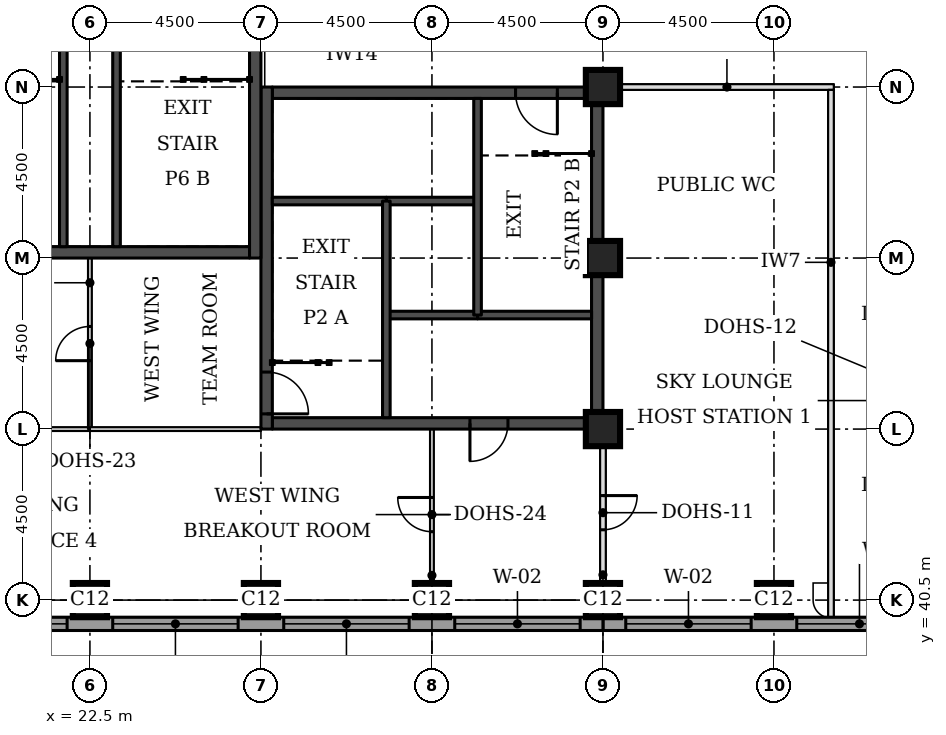
"""IFC4 building model, lengths in metres.
Left out: names, types, materials, properties, quantities, classifications, styles, units other than length and angle.
Written with IfcOpenShell. Run it as: python <this file> out.ifc"""

import sys

from ifc_helpers import new_model, si_unit, direction, frame, frame_2d, origin, origin_2d, place, context, subcontext, project, spatial, rectangle, extrude, element, fill, save


model = new_model("IFC4")
c1 = context("Model", 3, precision=1e-05, world=origin(), true_north=direction((0.0, 1.0)))
c2 = subcontext(c1, "Body", "Model", "MODEL_VIEW")
j1 = project(units=[si_unit("LENGTHUNIT", "METRE"), si_unit("PLANEANGLEUNIT", "RADIAN")], contexts=[c1])
p1 = place(None, origin())
s1 = spatial("IfcSite", under=j1, at=p1, CompositionType="ELEMENT")
p2 = place(p1, origin())
s2 = spatial("IfcBuilding", under=s1, at=p2, CompositionType="ELEMENT")
p3 = place(p2, frame((0.0, 0.0, 260.0)))
s3 = spatial("IfcBuildingStorey", under=s2, at=p3, CompositionType="ELEMENT", Elevation=260.0)
for number, where, z_axis, x_axis in (
    (1, (22.5, 40.5, 0.0), (0.0, 0.0, 1.0), (1.0, 0.0, 0.0)),
    (2, (27.0, 40.5, 0.0), (0.0, 0.0, 1.0), (1.0, 0.0, 0.0)),
    (3, (31.5, 40.5, 0.0), (0.0, 0.0, 1.0), (1.0, 0.0, 0.0)),
    (4, (36.0, 40.5, 0.0), (0.0, 0.0, 1.0), (1.0, 0.0, 0.0)),
    (5, (40.5, 40.5, 0.0), (0.0, 0.0, 1.0), (1.0, 0.0, 0.0)),
    (6, (36.0, 45.0, 0.0), (0.0, 0.0, 1.0), (1.0, 0.0, 0.0)),
    (7, (36.0, 49.5, 0.0), (0.0, 0.0, 1.0), (1.0, 0.0, 0.0)),
    (8, (36.0, 54.0, 0.0), (0.0, 0.0, 1.0), (1.0, 0.0, 0.0)),
):
    element("IfcColumn", number, at=place(p3, frame(where, z_axis=z_axis, x_axis=x_axis)), inside=s3, PredefinedType="COLUMN", context=c2, shape_type="SweptSolid", body=[
        extrude(rectangle(XDim=0.9, YDim=0.9, at=origin_2d()), origin(), (0.0, 0.0, 1.0), 3.7),
    ])
p4 = place(p3, frame((27.3, 45.15, 0.0), z_axis=(0.0, 0.0, 1.0), x_axis=(1.0, 0.0, 0.0)))
e9 = element("IfcWall", 9, at=p4, inside=s3, PredefinedType="SHEAR", context=c2, shape_type="SweptSolid", body=[
    extrude(rectangle(XDim=8.4, YDim=0.3, at=frame_2d((4.2, 0.0))), origin(), (0.0, 0.0, 1.0), 3.7),
])
p5 = place(p4, frame((5.2, 0.0, 0.0)))
e10 = element("IfcOpeningElement", 10, at=p5, cuts=e9, PredefinedType="OPENING", context=c2, shape_type="SweptSolid", body=[
    extrude(rectangle(XDim=1.0, YDim=2.1, at=frame_2d((0.5, 1.05))), frame((0.0, 0.16, 0.0), z_axis=(0.0, -1.0, 0.0), x_axis=(1.0, 0.0, 0.0)), (0.0, 0.0, 1.0), 0.32),
])
p6 = place(p3, frame((27.3, 53.85, 0.0), z_axis=(0.0, 0.0, 1.0), x_axis=(1.0, 0.0, 0.0)))
e11 = element("IfcWall", 11, at=p6, inside=s3, PredefinedType="SHEAR", context=c2, shape_type="SweptSolid", body=[
    extrude(rectangle(XDim=8.4, YDim=0.3, at=frame_2d((4.2, 0.0))), origin(), (0.0, 0.0, 1.0), 3.7),
])
p7 = place(p6, frame((6.4, 0.0, 0.0)))
e12 = element("IfcOpeningElement", 12, at=p7, cuts=e11, PredefinedType="OPENING", context=c2, shape_type="SweptSolid", body=[
    extrude(rectangle(XDim=1.1, YDim=2.1, at=frame_2d((0.55, 1.05))), frame((0.0, 0.16, 0.0), z_axis=(0.0, -1.0, 0.0), x_axis=(1.0, 0.0, 0.0)), (0.0, 0.0, 1.0), 0.32),
])
p8 = place(p3, frame((27.15, 45.0, 0.0), z_axis=(0.0, 0.0, 1.0), x_axis=(0.0, 1.0, 0.0)))
e13 = element("IfcWall", 13, at=p8, inside=s3, PredefinedType="SHEAR", context=c2, shape_type="SweptSolid", body=[
    extrude(rectangle(XDim=9.0, YDim=0.3, at=frame_2d((4.5, 0.0))), origin(), (0.0, 0.0, 1.0), 3.7),
])
p9 = place(p8, frame((0.4, 0.0, 0.0)))
e14 = element("IfcOpeningElement", 14, at=p9, cuts=e13, PredefinedType="OPENING", context=c2, shape_type="SweptSolid", body=[
    extrude(rectangle(XDim=1.1, YDim=2.1, at=frame_2d((0.55, 1.05))), frame((0.0, 0.16, 0.0), z_axis=(0.0, -1.0, 0.0), x_axis=(1.0, 0.0, 0.0)), (0.0, 0.0, 1.0), 0.32),
])
p10 = place(p3, frame((35.85, 45.0, 0.0), z_axis=(0.0, 0.0, 1.0), x_axis=(0.0, 1.0, 0.0)))
e15 = element("IfcWall", 15, at=p10, inside=s3, PredefinedType="SHEAR", context=c2, shape_type="SweptSolid", body=[
    extrude(rectangle(XDim=9.0, YDim=0.3, at=frame_2d((4.5, 0.0))), origin(), (0.0, 0.0, 1.0), 3.7),
])
p11 = place(p3, frame((18.3, 49.65, 0.0), z_axis=(0.0, 0.0, 1.0), x_axis=(1.0, 0.0, 0.0)))
e16 = element("IfcWall", 16, at=p11, inside=s3, PredefinedType="SHEAR", context=c2, shape_type="SweptSolid", body=[
    extrude(rectangle(XDim=8.4, YDim=0.3, at=frame_2d((4.2, 0.0))), origin(), (0.0, 0.0, 1.0), 3.7),
])
p12 = place(p3, frame((26.85, 49.5, 0.0), z_axis=(0.0, 0.0, 1.0), x_axis=(0.0, 1.0, 0.0)))
e17 = element("IfcWall", 17, at=p12, inside=s3, PredefinedType="SHEAR", context=c2, shape_type="SweptSolid", body=[
    extrude(rectangle(XDim=9.0, YDim=0.3, at=frame_2d((4.5, 0.0))), origin(), (0.0, 0.0, 1.0), 3.7),
])
p13 = place(p12, frame((6.6, 0.0, 0.0)))
e18 = element("IfcOpeningElement", 18, at=p13, cuts=e17, PredefinedType="OPENING", context=c2, shape_type="SweptSolid", body=[
    extrude(rectangle(XDim=1.8, YDim=2.1, at=frame_2d((0.9, 1.05))), frame((0.0, 0.16, 0.0), z_axis=(0.0, -1.0, 0.0), x_axis=(1.0, 0.0, 0.0)), (0.0, 0.0, 1.0), 0.32),
])
p14 = place(p3, frame((36.0, 39.875, 0.0), z_axis=(0.0, 0.0, 1.0), x_axis=(1.0, 0.0, 0.0)))
e19 = element("IfcWall", 19, at=p14, inside=s3, PredefinedType="STANDARD", context=c2, shape_type="SweptSolid", body=[
    extrude(rectangle(XDim=36.331, YDim=0.35, at=frame_2d((18.166, 0.0))), origin(), (0.0, 0.0, 1.0), 3.425),
])
p15 = place(p14, frame((0.6, 0.0, 0.9)))
e20 = element("IfcOpeningElement", 20, at=p15, cuts=e19, PredefinedType="OPENING", context=c2, shape_type="SweptSolid", body=[
    extrude(rectangle(XDim=3.3, YDim=1.9, at=frame_2d((1.65, 0.95))), frame((0.0, 0.185, 0.0), z_axis=(0.0, -1.0, 0.0), x_axis=(1.0, 0.0, 0.0)), (0.0, 0.0, 1.0), 0.37),
])
p16 = place(p14, frame((5.1, 0.0, 0.9)))
e21 = element("IfcOpeningElement", 21, at=p16, cuts=e19, PredefinedType="OPENING", context=c2, shape_type="SweptSolid", body=[
    extrude(rectangle(XDim=3.3, YDim=1.9, at=frame_2d((1.65, 0.95))), frame((0.0, 0.185, 0.0), z_axis=(0.0, -1.0, 0.0), x_axis=(1.0, 0.0, 0.0)), (0.0, 0.0, 1.0), 0.37),
])
p17 = place(p14, frame((9.6, 0.0, 0.9)))
e22 = element("IfcOpeningElement", 22, at=p17, cuts=e19, PredefinedType="OPENING", context=c2, shape_type="SweptSolid", body=[
    extrude(rectangle(XDim=3.3, YDim=1.9, at=frame_2d((1.65, 0.95))), frame((0.0, 0.185, 0.0), z_axis=(0.0, -1.0, 0.0), x_axis=(1.0, 0.0, 0.0)), (0.0, 0.0, 1.0), 0.37),
])
p18 = place(p14, frame((14.1, 0.0, 0.9)))
e23 = element("IfcOpeningElement", 23, at=p18, cuts=e19, PredefinedType="OPENING", context=c2, shape_type="SweptSolid", body=[
    extrude(rectangle(XDim=3.3, YDim=1.9, at=frame_2d((1.65, 0.95))), frame((0.0, 0.185, 0.0), z_axis=(0.0, -1.0, 0.0), x_axis=(1.0, 0.0, 0.0)), (0.0, 0.0, 1.0), 0.37),
])
p19 = place(p14, frame((18.6, 0.0, 0.9)))
e24 = element("IfcOpeningElement", 24, at=p19, cuts=e19, PredefinedType="OPENING", context=c2, shape_type="SweptSolid", body=[
    extrude(rectangle(XDim=3.3, YDim=1.9, at=frame_2d((1.65, 0.95))), frame((0.0, 0.185, 0.0), z_axis=(0.0, -1.0, 0.0), x_axis=(1.0, 0.0, 0.0)), (0.0, 0.0, 1.0), 0.37),
])
p20 = place(p14, frame((23.1, 0.0, 0.9)))
e25 = element("IfcOpeningElement", 25, at=p20, cuts=e19, PredefinedType="OPENING", context=c2, shape_type="SweptSolid", body=[
    extrude(rectangle(XDim=3.3, YDim=1.9, at=frame_2d((1.65, 0.95))), frame((0.0, 0.185, 0.0), z_axis=(0.0, -1.0, 0.0), x_axis=(1.0, 0.0, 0.0)), (0.0, 0.0, 1.0), 0.37),
])
p21 = place(p14, frame((27.6, 0.0, 0.9)))
e26 = element("IfcOpeningElement", 26, at=p21, cuts=e19, PredefinedType="OPENING", context=c2, shape_type="SweptSolid", body=[
    extrude(rectangle(XDim=3.3, YDim=1.9, at=frame_2d((1.65, 0.95))), frame((0.0, 0.185, 0.0), z_axis=(0.0, -1.0, 0.0), x_axis=(1.0, 0.0, 0.0)), (0.0, 0.0, 1.0), 0.37),
])
p22 = place(p14, frame((32.1, 0.0, 0.9)))
e27 = element("IfcOpeningElement", 27, at=p22, cuts=e19, PredefinedType="OPENING", context=c2, shape_type="SweptSolid", body=[
    extrude(rectangle(XDim=3.3, YDim=1.9, at=frame_2d((1.65, 0.95))), frame((0.0, 0.185, 0.0), z_axis=(0.0, -1.0, 0.0), x_axis=(1.0, 0.0, 0.0)), (0.0, 0.0, 1.0), 0.37),
])
p23 = place(p3, frame((17.669, 39.875, 0.0), z_axis=(0.0, 0.0, 1.0), x_axis=(1.0, 0.0, 0.0)))
e28 = element("IfcWall", 28, at=p23, inside=s3, PredefinedType="STANDARD", context=c2, shape_type="SweptSolid", body=[
    extrude(rectangle(XDim=18.331, YDim=0.35, at=frame_2d((9.166, 0.0))), origin(), (0.0, 0.0, 1.0), 3.375),
])
p24 = place(p23, frame((0.931, 0.0, 0.9)))
e29 = element("IfcOpeningElement", 29, at=p24, cuts=e28, PredefinedType="OPENING", context=c2, shape_type="SweptSolid", body=[
    extrude(rectangle(XDim=3.3, YDim=1.9, at=frame_2d((1.65, 0.95))), frame((0.0, 0.185, 0.0), z_axis=(0.0, -1.0, 0.0), x_axis=(1.0, 0.0, 0.0)), (0.0, 0.0, 1.0), 0.37),
])
p25 = place(p23, frame((5.431, 0.0, 0.9)))
e30 = element("IfcOpeningElement", 30, at=p25, cuts=e28, PredefinedType="OPENING", context=c2, shape_type="SweptSolid", body=[
    extrude(rectangle(XDim=3.3, YDim=1.9, at=frame_2d((1.65, 0.95))), frame((0.0, 0.185, 0.0), z_axis=(0.0, -1.0, 0.0), x_axis=(1.0, 0.0, 0.0)), (0.0, 0.0, 1.0), 0.37),
])
p26 = place(p23, frame((9.931, 0.0, 0.9)))
e31 = element("IfcOpeningElement", 31, at=p26, cuts=e28, PredefinedType="OPENING", context=c2, shape_type="SweptSolid", body=[
    extrude(rectangle(XDim=3.3, YDim=1.9, at=frame_2d((1.65, 0.95))), frame((0.0, 0.185, 0.0), z_axis=(0.0, -1.0, 0.0), x_axis=(1.0, 0.0, 0.0)), (0.0, 0.0, 1.0), 0.37),
])
p27 = place(p23, frame((14.431, 0.0, 0.9)))
e32 = element("IfcOpeningElement", 32, at=p27, cuts=e28, PredefinedType="OPENING", context=c2, shape_type="SweptSolid", body=[
    extrude(rectangle(XDim=3.3, YDim=1.9, at=frame_2d((1.65, 0.95))), frame((0.0, 0.185, 0.0), z_axis=(0.0, -1.0, 0.0), x_axis=(1.0, 0.0, 0.0)), (0.0, 0.0, 1.0), 0.37),
])
p28 = place(p3, frame((36.45, 54.0, 0.0), z_axis=(0.0, 0.0, 1.0), x_axis=(1.0, 0.0, 0.0)))
e33 = element("IfcWall", 33, at=p28, inside=s3, PredefinedType="PARTITIONING", context=c2, shape_type="SweptSolid", body=[
    extrude(rectangle(XDim=5.625, YDim=0.15, at=frame_2d((2.812, 0.0))), origin(), (0.0, 0.0, 1.0), 3.45),
])
p29 = place(p3, frame((42.0, 40.05, 0.0), z_axis=(0.0, 0.0, 1.0), x_axis=(0.0, 1.0, 0.0)))
e34 = element("IfcWall", 34, at=p29, inside=s3, PredefinedType="PARTITIONING", context=c2, shape_type="SweptSolid", body=[
    extrude(rectangle(XDim=13.875, YDim=0.15, at=frame_2d((6.938, 0.0))), origin(), (0.0, 0.0, 1.0), 3.45),
])
p30 = place(p3, frame((36.0, 40.95, 0.0), z_axis=(0.0, 0.0, 1.0), x_axis=(0.0, 1.0, 0.0)))
e35 = element("IfcWall", 35, at=p30, inside=s3, PredefinedType="PARTITIONING", context=c2, shape_type="SweptSolid", body=[
    extrude(rectangle(XDim=3.63, YDim=0.15, at=frame_2d((1.815, 0.0))), origin(), (0.0, 0.0, 1.0), 3.45),
])
p31 = place(p30, frame((1.4, 0.0, 0.0)))
e36 = element("IfcOpeningElement", 36, at=p31, cuts=e35, PredefinedType="OPENING", context=c2, shape_type="SweptSolid", body=[
    extrude(rectangle(XDim=0.9, YDim=2.1, at=frame_2d((0.45, 1.05))), frame((0.0, 0.085, 0.0), z_axis=(0.0, -1.0, 0.0), x_axis=(1.0, 0.0, 0.0)), (0.0, 0.0, 1.0), 0.17),
])
p32 = place(p3, frame((22.5, 45.0, 0.0), z_axis=(0.0, 0.0, 1.0), x_axis=(-1.0, 0.0, 0.0)))
e37 = element("IfcWall", 37, at=p32, inside=s3, PredefinedType="PARTITIONING", context=c2, shape_type="SweptSolid", body=[
    extrude(rectangle(XDim=9.0, YDim=0.1, at=frame_2d((4.5, 0.0))), origin(), (0.0, 0.0, 1.0), 2.4),
])
p33 = place(p32, frame((4.05, 0.0, 0.0)))
e38 = element("IfcOpeningElement", 38, at=p33, cuts=e37, PredefinedType="OPENING", context=c2, shape_type="SweptSolid", body=[
    extrude(rectangle(XDim=0.9, YDim=2.1, at=frame_2d((0.45, 1.05))), frame((0.0, 0.06, 0.0), z_axis=(0.0, -1.0, 0.0), x_axis=(1.0, 0.0, 0.0)), (0.0, 0.0, 1.0), 0.12),
])
p34 = place(p3, frame((22.5, 49.5, 0.0), z_axis=(0.0, 0.0, 1.0), x_axis=(0.0, -1.0, 0.0)))
e39 = element("IfcWall", 39, at=p34, inside=s3, PredefinedType="PARTITIONING", context=c2, shape_type="SweptSolid", body=[
    extrude(rectangle(XDim=4.5, YDim=0.1, at=frame_2d((2.25, 0.0))), origin(), (0.0, 0.0, 1.0), 3.45),
])
p35 = place(p34, frame((1.8, 0.0, 0.0)))
e40 = element("IfcOpeningElement", 40, at=p35, cuts=e39, PredefinedType="OPENING", context=c2, shape_type="SweptSolid", body=[
    extrude(rectangle(XDim=0.9, YDim=2.1, at=frame_2d((0.45, 1.05))), frame((0.0, 0.06, 0.0), z_axis=(0.0, -1.0, 0.0), x_axis=(1.0, 0.0, 0.0)), (0.0, 0.0, 1.0), 0.12),
])
p36 = place(p3, frame((22.5, 45.0, 0.0), z_axis=(0.0, 0.0, 1.0), x_axis=(1.0, 0.0, 0.0)))
e41 = element("IfcWall", 41, at=p36, inside=s3, PredefinedType="PARTITIONING", context=c2, shape_type="SweptSolid", body=[
    extrude(rectangle(XDim=4.5, YDim=0.1, at=frame_2d((2.25, 0.0))), origin(), (0.0, 0.0, 1.0), 2.4),
])
p37 = place(p3, frame((31.5, 45.0, 0.0), z_axis=(0.0, 0.0, 1.0), x_axis=(0.0, -1.0, 0.0)))
e42 = element("IfcWall", 42, at=p37, inside=s3, PredefinedType="PARTITIONING", context=c2, shape_type="SweptSolid", body=[
    extrude(rectangle(XDim=4.5, YDim=0.1, at=frame_2d((2.25, 0.0))), origin(), (0.0, 0.0, 1.0), 3.45),
])
p38 = place(p37, frame((1.8, 0.0, 0.0)))
e43 = element("IfcOpeningElement", 43, at=p38, cuts=e42, PredefinedType="OPENING", context=c2, shape_type="SweptSolid", body=[
    extrude(rectangle(XDim=0.9, YDim=2.1, at=frame_2d((0.45, 1.05))), frame((0.0, 0.06, 0.0), z_axis=(0.0, -1.0, 0.0), x_axis=(1.0, 0.0, 0.0)), (0.0, 0.0, 1.0), 0.12),
])
p39 = place(p3, frame((30.3, 48.0, 0.0), z_axis=(0.0, 0.0, 1.0), x_axis=(1.0, 0.0, 0.0)))
e44 = element("IfcWall", 44, at=p39, inside=s3, PredefinedType="SOLIDWALL", context=c2, shape_type="SweptSolid", body=[
    extrude(rectangle(XDim=2.4, YDim=0.2, at=frame_2d((1.2, 0.0))), origin(), (0.0, 0.0, 1.0), 3.45),
])
p40 = place(p3, frame((32.7, 48.0, 0.0), z_axis=(0.0, 0.0, 1.0), x_axis=(1.0, 0.0, 0.0)))
e45 = element("IfcWall", 45, at=p40, inside=s3, PredefinedType="SOLIDWALL", context=c2, shape_type="SweptSolid", body=[
    extrude(rectangle(XDim=3.0, YDim=0.2, at=frame_2d((1.5, 0.0))), origin(), (0.0, 0.0, 1.0), 3.45),
])
p41 = place(p3, frame((30.3, 51.0, 0.0), z_axis=(0.0, 0.0, 1.0), x_axis=(1.0, 0.0, 0.0)))
e46 = element("IfcWall", 46, at=p41, inside=s3, PredefinedType="SOLIDWALL", context=c2, shape_type="SweptSolid", body=[
    extrude(rectangle(XDim=2.4, YDim=0.2, at=frame_2d((1.2, 0.0))), origin(), (0.0, 0.0, 1.0), 3.45),
])
p42 = place(p3, frame((27.3, 51.0, 0.0), z_axis=(0.0, 0.0, 1.0), x_axis=(1.0, 0.0, 0.0)))
e47 = element("IfcWall", 47, at=p42, inside=s3, PredefinedType="SOLIDWALL", context=c2, shape_type="SweptSolid", body=[
    extrude(rectangle(XDim=3.0, YDim=0.2, at=frame_2d((1.5, 0.0))), origin(), (0.0, 0.0, 1.0), 3.45),
])
for number, where, z_axis, x_axis in (
    (48, (30.3, 45.3, 0.0), (0.0, 0.0, 1.0), (0.0, 1.0, 0.0)),
    (49, (32.7, 48.0, 0.0), (0.0, 0.0, 1.0), (0.0, 1.0, 0.0)),
):
    element("IfcWall", number, at=place(p3, frame(where, z_axis=z_axis, x_axis=x_axis)), inside=s3, PredefinedType="SOLIDWALL", context=c2, shape_type="SweptSolid", body=[
        extrude(rectangle(XDim=5.7, YDim=0.2, at=frame_2d((2.85, 0.0))), origin(), (0.0, 0.0, 1.0), 3.45),
    ])
for number, where, z_axis, x_axis in (
    (50, (21.8, 49.8, 0.0), (0.0, 0.0, 1.0), (0.0, 1.0, 0.0)),
    (51, (23.2, 49.8, 0.0), (0.0, 0.0, 1.0), (0.0, 1.0, 0.0)),
):
    element("IfcWall", number, at=place(p3, frame(where, z_axis=z_axis, x_axis=x_axis)), inside=s3, PredefinedType="SOLIDWALL", context=c2, shape_type="SweptSolid", body=[
        extrude(rectangle(XDim=6.05, YDim=0.2, at=frame_2d((3.025, 0.0))), origin(), (0.0, 0.0, 1.0), 3.45),
    ])
p43 = place(p15, origin())
e52 = element("IfcWindow", 52, at=p43, inside=s3, PartitioningType="SINGLE_PANEL", PredefinedType="WINDOW", context=c2, shape_type="SweptSolid", body=[
    extrude(rectangle(XDim=3.3, YDim=1.9, at=frame_2d((1.65, 0.95))), frame((0.0, 0.085, 0.0), z_axis=(0.0, -1.0, 0.0), x_axis=(1.0, 0.0, 0.0)), (0.0, 0.0, 1.0), 0.06),
])
fill(e20, e52)
p44 = place(p16, origin())
e53 = element("IfcWindow", 53, at=p44, inside=s3, PartitioningType="SINGLE_PANEL", PredefinedType="WINDOW", context=c2, shape_type="SweptSolid", body=[
    extrude(rectangle(XDim=3.3, YDim=1.9, at=frame_2d((1.65, 0.95))), frame((0.0, 0.085, 0.0), z_axis=(0.0, -1.0, 0.0), x_axis=(1.0, 0.0, 0.0)), (0.0, 0.0, 1.0), 0.06),
])
fill(e21, e53)
p45 = place(p24, origin())
e54 = element("IfcWindow", 54, at=p45, inside=s3, PartitioningType="SINGLE_PANEL", PredefinedType="WINDOW", context=c2, shape_type="SweptSolid", body=[
    extrude(rectangle(XDim=3.3, YDim=1.9, at=frame_2d((1.65, 0.95))), frame((0.0, 0.085, 0.0), z_axis=(0.0, -1.0, 0.0), x_axis=(1.0, 0.0, 0.0)), (0.0, 0.0, 1.0), 0.06),
])
fill(e29, e54)
p46 = place(p25, origin())
e55 = element("IfcWindow", 55, at=p46, inside=s3, PartitioningType="SINGLE_PANEL", PredefinedType="WINDOW", context=c2, shape_type="SweptSolid", body=[
    extrude(rectangle(XDim=3.3, YDim=1.9, at=frame_2d((1.65, 0.95))), frame((0.0, 0.085, 0.0), z_axis=(0.0, -1.0, 0.0), x_axis=(1.0, 0.0, 0.0)), (0.0, 0.0, 1.0), 0.06),
])
fill(e30, e55)
p47 = place(p26, origin())
e56 = element("IfcWindow", 56, at=p47, inside=s3, PartitioningType="SINGLE_PANEL", PredefinedType="WINDOW", context=c2, shape_type="SweptSolid", body=[
    extrude(rectangle(XDim=3.3, YDim=1.9, at=frame_2d((1.65, 0.95))), frame((0.0, 0.085, 0.0), z_axis=(0.0, -1.0, 0.0), x_axis=(1.0, 0.0, 0.0)), (0.0, 0.0, 1.0), 0.06),
])
fill(e31, e56)
p48 = place(p27, origin())
e57 = element("IfcWindow", 57, at=p48, inside=s3, PartitioningType="SINGLE_PANEL", PredefinedType="WINDOW", context=c2, shape_type="SweptSolid", body=[
    extrude(rectangle(XDim=3.3, YDim=1.9, at=frame_2d((1.65, 0.95))), frame((0.0, 0.085, 0.0), z_axis=(0.0, -1.0, 0.0), x_axis=(1.0, 0.0, 0.0)), (0.0, 0.0, 1.0), 0.06),
])
fill(e32, e57)
p49 = place(p31, frame((0.9, 0.0, 0.0), z_axis=(0.0, 0.0, 1.0), x_axis=(-1.0, 0.0, 0.0)))
e58 = element("IfcDoor", 58, at=p49, inside=s3, OperationType="SINGLE_SWING_LEFT", PredefinedType="DOOR", context=c2, shape_type="SweptSolid", body=[
    extrude(rectangle(XDim=0.9, YDim=2.1, at=frame_2d((0.45, 1.05))), frame((0.0, 0.025, 0.0), z_axis=(0.0, -1.0, 0.0), x_axis=(1.0, 0.0, 0.0)), (0.0, 0.0, 1.0), 0.05),
])
fill(e36, e58)
p50 = place(p35, frame((0.9, 0.0, 0.0), z_axis=(0.0, 0.0, 1.0), x_axis=(-1.0, 0.0, 0.0)))
e59 = element("IfcDoor", 59, at=p50, inside=s3, OperationType="SINGLE_SWING_LEFT", PredefinedType="DOOR", context=c2, shape_type="SweptSolid", body=[
    extrude(rectangle(XDim=0.9, YDim=2.1, at=frame_2d((0.45, 1.05))), frame((0.0, 0.025, 0.0), z_axis=(0.0, -1.0, 0.0), x_axis=(1.0, 0.0, 0.0)), (0.0, 0.0, 1.0), 0.05),
])
fill(e40, e59)
p51 = place(p38, frame((0.9, 0.0, 0.0), z_axis=(0.0, 0.0, 1.0), x_axis=(-1.0, 0.0, 0.0)))
e60 = element("IfcDoor", 60, at=p51, inside=s3, OperationType="SINGLE_SWING_RIGHT", PredefinedType="DOOR", context=c2, shape_type="SweptSolid", body=[
    extrude(rectangle(XDim=0.9, YDim=2.1, at=frame_2d((0.45, 1.05))), frame((0.0, 0.025, 0.0), z_axis=(0.0, -1.0, 0.0), x_axis=(1.0, 0.0, 0.0)), (0.0, 0.0, 1.0), 0.05),
])
fill(e43, e60)
p52 = place(p9, frame((1.1, 0.0, 0.0), z_axis=(0.0, 0.0, 1.0), x_axis=(-1.0, 0.0, 0.0)))
e61 = element("IfcDoor", 61, at=p52, inside=s3, OperationType="SINGLE_SWING_RIGHT", PredefinedType="DOOR", context=c2, shape_type="SweptSolid", body=[
    extrude(rectangle(XDim=1.1, YDim=2.1, at=frame_2d((0.55, 1.05))), frame((0.0, 0.025, 0.0), z_axis=(0.0, -1.0, 0.0), x_axis=(1.0, 0.0, 0.0)), (0.0, 0.0, 1.0), 0.05),
])
fill(e14, e61)
p53 = place(p7, frame((1.1, 0.0, 0.0), z_axis=(0.0, 0.0, 1.0), x_axis=(-1.0, 0.0, 0.0)))
e62 = element("IfcDoor", 62, at=p53, inside=s3, OperationType="SINGLE_SWING_LEFT", PredefinedType="DOOR", context=c2, shape_type="SweptSolid", body=[
    extrude(rectangle(XDim=1.1, YDim=2.1, at=frame_2d((0.55, 1.05))), frame((0.0, 0.025, 0.0), z_axis=(0.0, -1.0, 0.0), x_axis=(1.0, 0.0, 0.0)), (0.0, 0.0, 1.0), 0.05),
])
fill(e12, e62)
p54 = place(p5, frame((1.0, 0.0, 0.0), z_axis=(0.0, 0.0, 1.0), x_axis=(-1.0, 0.0, 0.0)))
e63 = element("IfcDoor", 63, at=p54, inside=s3, OperationType="SINGLE_SWING_RIGHT", PredefinedType="DOOR", context=c2, shape_type="SweptSolid", body=[
    extrude(rectangle(XDim=1.0, YDim=2.1, at=frame_2d((0.5, 1.05))), frame((0.0, 0.025, 0.0), z_axis=(0.0, -1.0, 0.0), x_axis=(1.0, 0.0, 0.0)), (0.0, 0.0, 1.0), 0.05),
])
fill(e10, e63)
save(model, sys.argv[1])
